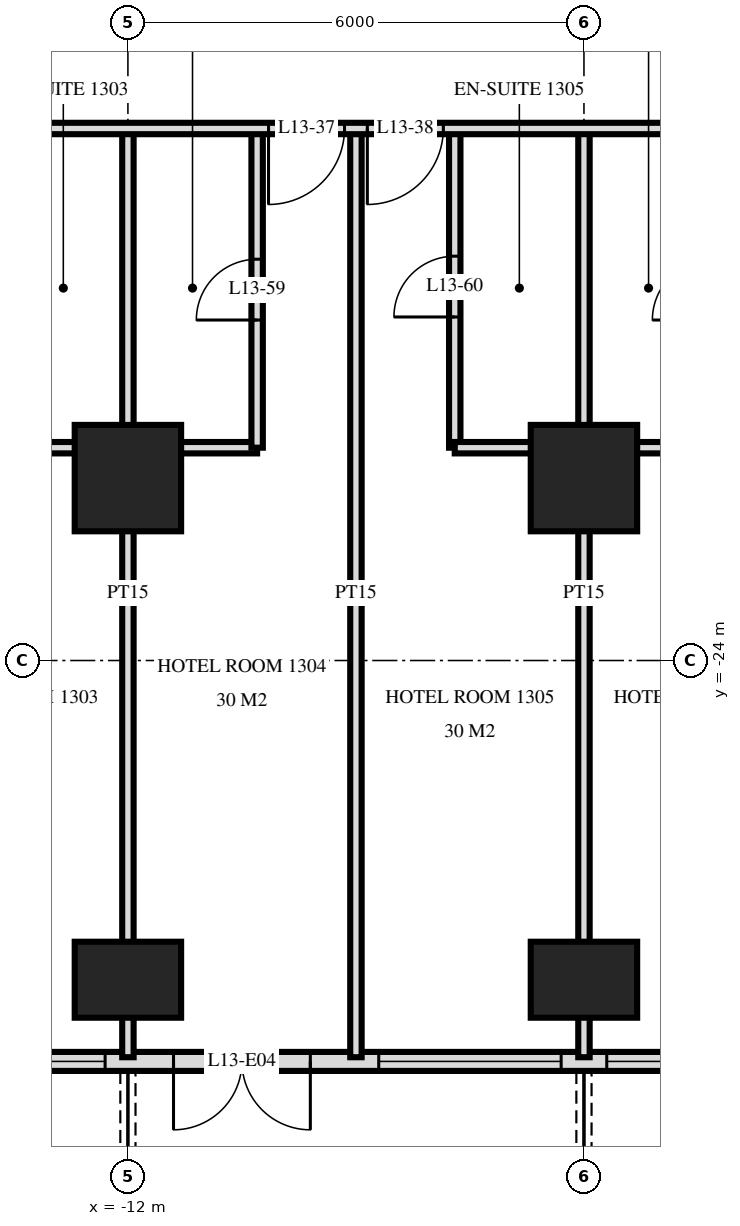
"""IFC4 building model, lengths in metres.
Left out: names, types, materials, properties, quantities, classifications, styles, units other than length and angle.
Written with IfcOpenShell. Run it as: python <this file> out.ifc"""

import sys

from ifc_helpers import new_model, si_unit, direction, frame, frame_2d, origin, origin_2d, place, context, subcontext, project, spatial, rectangle, extrude, element, fill, save


model = new_model("IFC4")
c1 = context("Model", 3, precision=1e-05, world=origin(), true_north=direction((0.0, 1.0)))
c2 = subcontext(c1, "Body", "Model", "MODEL_VIEW")
j1 = project(units=[si_unit("LENGTHUNIT", "METRE"), si_unit("PLANEANGLEUNIT", "RADIAN")], contexts=[c1])
p1 = place(None, origin())
s1 = spatial("IfcSite", under=j1, at=p1, CompositionType="ELEMENT")
p2 = place(p1, origin())
s2 = spatial("IfcBuilding", under=s1, at=p2, CompositionType="ELEMENT")
p3 = place(p2, frame((0.0, 0.0, 56.4)))
s3 = spatial("IfcBuildingStorey", under=s2, at=p3, CompositionType="ELEMENT", Elevation=56.4)
p4 = place(p3, frame((-12.0, -28.2, 0.0), z_axis=(0.0, 0.0, 1.0), x_axis=(1.0, 0.0, 0.0)))
e1 = element("IfcColumn", 1, at=p4, inside=s3, PredefinedType="COLUMN", context=c2, shape_type="SweptSolid", body=[
    extrude(rectangle(XDim=1.4, YDim=1.0, at=origin_2d()), origin(), (0.0, 0.0, 1.0), 3.6),
])
p5 = place(p3, frame((-12.0, -21.6, 0.0), z_axis=(0.0, 0.0, 1.0), x_axis=(1.0, 0.0, 0.0)))
e2 = element("IfcColumn", 2, at=p5, inside=s3, PredefinedType="COLUMN", context=c2, shape_type="SweptSolid", body=[
    extrude(rectangle(XDim=1.4, YDim=1.4, at=origin_2d()), origin(), (0.0, 0.0, 1.0), 3.6),
])
p6 = place(p3, frame((-6.0, -28.2, 0.0), z_axis=(0.0, 0.0, 1.0), x_axis=(1.0, 0.0, 0.0)))
e3 = element("IfcColumn", 3, at=p6, inside=s3, PredefinedType="COLUMN", context=c2, shape_type="SweptSolid", body=[
    extrude(rectangle(XDim=1.4, YDim=1.0, at=origin_2d()), origin(), (0.0, 0.0, 1.0), 3.6),
])
p7 = place(p3, frame((-6.0, -21.6, 0.0), z_axis=(0.0, 0.0, 1.0), x_axis=(1.0, 0.0, 0.0)))
e4 = element("IfcColumn", 4, at=p7, inside=s3, PredefinedType="COLUMN", context=c2, shape_type="SweptSolid", body=[
    extrude(rectangle(XDim=1.4, YDim=1.4, at=origin_2d()), origin(), (0.0, 0.0, 1.0), 3.6),
])
p8 = place(p3, frame((-28.775, -29.275, 0.0), z_axis=(0.0, 0.0, 1.0), x_axis=(1.0, 0.0, 0.0)))
e5 = element("IfcWall", 5, at=p8, inside=s3, PredefinedType="SOLIDWALL", context=c2, shape_type="SweptSolid", body=[
    extrude(rectangle(XDim=57.551, YDim=0.25, at=frame_2d((28.775, 0.0))), origin(), (0.0, 0.0, 1.0), 3.32),
])
p9 = place(p8, frame((0.575, 0.0, 0.0)))
e6 = element("IfcOpeningElement", 6, at=p9, cuts=e5, PredefinedType="OPENING", context=c2, shape_type="SweptSolid", body=[
    extrude(rectangle(XDim=1.8, YDim=2.4, at=frame_2d((0.9, 1.2))), frame((0.0, 0.135, 0.0), z_axis=(0.0, -1.0, 0.0), x_axis=(1.0, 0.0, 0.0)), (0.0, 0.0, 1.0), 0.27),
])
p10 = place(p8, frame((5.375, 0.0, 0.0)))
e7 = element("IfcOpeningElement", 7, at=p10, cuts=e5, PredefinedType="OPENING", context=c2, shape_type="SweptSolid", body=[
    extrude(rectangle(XDim=1.8, YDim=2.4, at=frame_2d((0.9, 1.2))), frame((0.0, 0.135, 0.0), z_axis=(0.0, -1.0, 0.0), x_axis=(1.0, 0.0, 0.0)), (0.0, 0.0, 1.0), 0.27),
])
p11 = place(p8, frame((8.075, 0.0, 0.3)))
e8 = element("IfcOpeningElement", 8, at=p11, cuts=e5, PredefinedType="OPENING", context=c2, shape_type="SweptSolid", body=[
    extrude(rectangle(XDim=2.4, YDim=2.1, at=frame_2d((1.2, 1.05))), frame((0.0, 0.135, 0.0), z_axis=(0.0, -1.0, 0.0), x_axis=(1.0, 0.0, 0.0)), (0.0, 0.0, 1.0), 0.27),
])
p12 = place(p8, frame((11.375, 0.0, 0.0)))
e9 = element("IfcOpeningElement", 9, at=p12, cuts=e5, PredefinedType="OPENING", context=c2, shape_type="SweptSolid", body=[
    extrude(rectangle(XDim=1.8, YDim=2.4, at=frame_2d((0.9, 1.2))), frame((0.0, 0.135, 0.0), z_axis=(0.0, -1.0, 0.0), x_axis=(1.0, 0.0, 0.0)), (0.0, 0.0, 1.0), 0.27),
])
p13 = place(p8, frame((14.075, 0.0, 0.3)))
e10 = element("IfcOpeningElement", 10, at=p13, cuts=e5, PredefinedType="OPENING", context=c2, shape_type="SweptSolid", body=[
    extrude(rectangle(XDim=2.4, YDim=2.1, at=frame_2d((1.2, 1.05))), frame((0.0, 0.135, 0.0), z_axis=(0.0, -1.0, 0.0), x_axis=(1.0, 0.0, 0.0)), (0.0, 0.0, 1.0), 0.27),
])
p14 = place(p8, frame((17.375, 0.0, 0.0)))
e11 = element("IfcOpeningElement", 11, at=p14, cuts=e5, PredefinedType="OPENING", context=c2, shape_type="SweptSolid", body=[
    extrude(rectangle(XDim=1.8, YDim=2.4, at=frame_2d((0.9, 1.2))), frame((0.0, 0.135, 0.0), z_axis=(0.0, -1.0, 0.0), x_axis=(1.0, 0.0, 0.0)), (0.0, 0.0, 1.0), 0.27),
])
p15 = place(p8, frame((20.075, 0.0, 0.3)))
e12 = element("IfcOpeningElement", 12, at=p15, cuts=e5, PredefinedType="OPENING", context=c2, shape_type="SweptSolid", body=[
    extrude(rectangle(XDim=2.4, YDim=2.1, at=frame_2d((1.2, 1.05))), frame((0.0, 0.135, 0.0), z_axis=(0.0, -1.0, 0.0), x_axis=(1.0, 0.0, 0.0)), (0.0, 0.0, 1.0), 0.27),
])
p16 = place(p8, frame((23.075, 0.0, 0.3)))
e13 = element("IfcOpeningElement", 13, at=p16, cuts=e5, PredefinedType="OPENING", context=c2, shape_type="SweptSolid", body=[
    extrude(rectangle(XDim=2.4, YDim=2.1, at=frame_2d((1.2, 1.05))), frame((0.0, 0.135, 0.0), z_axis=(0.0, -1.0, 0.0), x_axis=(1.0, 0.0, 0.0)), (0.0, 0.0, 1.0), 0.27),
])
p17 = place(p8, frame((26.375, 0.0, 0.0)))
e14 = element("IfcOpeningElement", 14, at=p17, cuts=e5, PredefinedType="OPENING", context=c2, shape_type="SweptSolid", body=[
    extrude(rectangle(XDim=1.8, YDim=2.4, at=frame_2d((0.9, 1.2))), frame((0.0, 0.135, 0.0), z_axis=(0.0, -1.0, 0.0), x_axis=(1.0, 0.0, 0.0)), (0.0, 0.0, 1.0), 0.27),
])
p18 = place(p8, frame((29.075, 0.0, 0.3)))
e15 = element("IfcOpeningElement", 15, at=p18, cuts=e5, PredefinedType="OPENING", context=c2, shape_type="SweptSolid", body=[
    extrude(rectangle(XDim=2.4, YDim=2.1, at=frame_2d((1.2, 1.05))), frame((0.0, 0.135, 0.0), z_axis=(0.0, -1.0, 0.0), x_axis=(1.0, 0.0, 0.0)), (0.0, 0.0, 1.0), 0.27),
])
p19 = place(p8, frame((32.375, 0.0, 0.0)))
e16 = element("IfcOpeningElement", 16, at=p19, cuts=e5, PredefinedType="OPENING", context=c2, shape_type="SweptSolid", body=[
    extrude(rectangle(XDim=1.8, YDim=2.4, at=frame_2d((0.9, 1.2))), frame((0.0, 0.135, 0.0), z_axis=(0.0, -1.0, 0.0), x_axis=(1.0, 0.0, 0.0)), (0.0, 0.0, 1.0), 0.27),
])
p20 = place(p8, frame((35.375, 0.0, 0.0)))
e17 = element("IfcOpeningElement", 17, at=p20, cuts=e5, PredefinedType="OPENING", context=c2, shape_type="SweptSolid", body=[
    extrude(rectangle(XDim=1.8, YDim=2.4, at=frame_2d((0.9, 1.2))), frame((0.0, 0.135, 0.0), z_axis=(0.0, -1.0, 0.0), x_axis=(1.0, 0.0, 0.0)), (0.0, 0.0, 1.0), 0.27),
])
p21 = place(p8, frame((38.075, 0.0, 0.3)))
e18 = element("IfcOpeningElement", 18, at=p21, cuts=e5, PredefinedType="OPENING", context=c2, shape_type="SweptSolid", body=[
    extrude(rectangle(XDim=2.4, YDim=2.1, at=frame_2d((1.2, 1.05))), frame((0.0, 0.135, 0.0), z_axis=(0.0, -1.0, 0.0), x_axis=(1.0, 0.0, 0.0)), (0.0, 0.0, 1.0), 0.27),
])
p22 = place(p8, frame((41.375, 0.0, 0.0)))
e19 = element("IfcOpeningElement", 19, at=p22, cuts=e5, PredefinedType="OPENING", context=c2, shape_type="SweptSolid", body=[
    extrude(rectangle(XDim=1.8, YDim=2.4, at=frame_2d((0.9, 1.2))), frame((0.0, 0.135, 0.0), z_axis=(0.0, -1.0, 0.0), x_axis=(1.0, 0.0, 0.0)), (0.0, 0.0, 1.0), 0.27),
])
p23 = place(p8, frame((44.075, 0.0, 0.3)))
e20 = element("IfcOpeningElement", 20, at=p23, cuts=e5, PredefinedType="OPENING", context=c2, shape_type="SweptSolid", body=[
    extrude(rectangle(XDim=2.4, YDim=2.1, at=frame_2d((1.2, 1.05))), frame((0.0, 0.135, 0.0), z_axis=(0.0, -1.0, 0.0), x_axis=(1.0, 0.0, 0.0)), (0.0, 0.0, 1.0), 0.27),
])
p24 = place(p8, frame((47.075, 0.0, 0.3)))
e21 = element("IfcOpeningElement", 21, at=p24, cuts=e5, PredefinedType="OPENING", context=c2, shape_type="SweptSolid", body=[
    extrude(rectangle(XDim=2.4, YDim=2.1, at=frame_2d((1.2, 1.05))), frame((0.0, 0.135, 0.0), z_axis=(0.0, -1.0, 0.0), x_axis=(1.0, 0.0, 0.0)), (0.0, 0.0, 1.0), 0.27),
])
p25 = place(p8, frame((50.375, 0.0, 0.0)))
e22 = element("IfcOpeningElement", 22, at=p25, cuts=e5, PredefinedType="OPENING", context=c2, shape_type="SweptSolid", body=[
    extrude(rectangle(XDim=1.8, YDim=2.4, at=frame_2d((0.9, 1.2))), frame((0.0, 0.135, 0.0), z_axis=(0.0, -1.0, 0.0), x_axis=(1.0, 0.0, 0.0)), (0.0, 0.0, 1.0), 0.27),
])
p26 = place(p8, frame((53.375, 0.0, 0.0)))
e23 = element("IfcOpeningElement", 23, at=p26, cuts=e5, PredefinedType="OPENING", context=c2, shape_type="SweptSolid", body=[
    extrude(rectangle(XDim=1.8, YDim=2.4, at=frame_2d((0.9, 1.2))), frame((0.0, 0.135, 0.0), z_axis=(0.0, -1.0, 0.0), x_axis=(1.0, 0.0, 0.0)), (0.0, 0.0, 1.0), 0.27),
])
p27 = place(p3, frame((-6.0, -29.22, 0.0), z_axis=(0.0, 0.0, 1.0), x_axis=(0.0, 1.0, 0.0)))
e24 = element("IfcWall", 24, at=p27, inside=s3, PredefinedType="PARTITIONING", context=c2, shape_type="SweptSolid", body=[
    extrude(rectangle(XDim=12.22, YDim=0.15, at=frame_2d((6.11, 0.0))), origin(), (0.0, 0.0, 1.0), 3.32),
])
p28 = place(p3, frame((-7.7, -21.2, 0.0), z_axis=(0.0, 0.0, 1.0), x_axis=(0.0, 1.0, 0.0)))
e25 = element("IfcWall", 25, at=p28, inside=s3, PredefinedType="PARTITIONING", context=c2, shape_type="SweptSolid", body=[
    extrude(rectangle(XDim=4.2, YDim=0.15, at=frame_2d((2.1, 0.0))), origin(), (0.0, 0.0, 1.0), 3.32),
])
p29 = place(p28, frame((1.72, 0.0, 0.0)))
e26 = element("IfcOpeningElement", 26, at=p29, cuts=e25, PredefinedType="OPENING", context=c2, shape_type="SweptSolid", body=[
    extrude(rectangle(XDim=0.8, YDim=2.1, at=frame_2d((0.4, 1.05))), frame((0.0, 0.085, 0.0), z_axis=(0.0, -1.0, 0.0), x_axis=(1.0, 0.0, 0.0)), (0.0, 0.0, 1.0), 0.17),
])
p30 = place(p3, frame((-9.0, -29.22, 0.0), z_axis=(0.0, 0.0, 1.0), x_axis=(0.0, 1.0, 0.0)))
e27 = element("IfcWall", 27, at=p30, inside=s3, PredefinedType="PARTITIONING", context=c2, shape_type="SweptSolid", body=[
    extrude(rectangle(XDim=12.22, YDim=0.15, at=frame_2d((6.11, 0.0))), origin(), (0.0, 0.0, 1.0), 3.32),
])
p31 = place(p3, frame((-10.3, -21.2, 0.0), z_axis=(0.0, 0.0, 1.0), x_axis=(0.0, 1.0, 0.0)))
e28 = element("IfcWall", 28, at=p31, inside=s3, PredefinedType="PARTITIONING", context=c2, shape_type="SweptSolid", body=[
    extrude(rectangle(XDim=4.2, YDim=0.15, at=frame_2d((2.1, 0.0))), origin(), (0.0, 0.0, 1.0), 3.32),
])
p32 = place(p31, frame((1.68, 0.0, 0.0)))
e29 = element("IfcOpeningElement", 29, at=p32, cuts=e28, PredefinedType="OPENING", context=c2, shape_type="SweptSolid", body=[
    extrude(rectangle(XDim=0.8, YDim=2.1, at=frame_2d((0.4, 1.05))), frame((0.0, 0.085, 0.0), z_axis=(0.0, -1.0, 0.0), x_axis=(1.0, 0.0, 0.0)), (0.0, 0.0, 1.0), 0.17),
])
p33 = place(p3, frame((-12.0, -29.22, 0.0), z_axis=(0.0, 0.0, 1.0), x_axis=(0.0, 1.0, 0.0)))
e30 = element("IfcWall", 30, at=p33, inside=s3, PredefinedType="PARTITIONING", context=c2, shape_type="SweptSolid", body=[
    extrude(rectangle(XDim=12.22, YDim=0.15, at=frame_2d((6.11, 0.0))), origin(), (0.0, 0.0, 1.0), 3.32),
])
for number, where, z_axis, x_axis in (
    (31, (-13.7, -21.2, 0.0), (0.0, 0.0, 1.0), (1.0, 0.0, 0.0)),
    (32, (-7.7, -21.2, 0.0), (0.0, 0.0, 1.0), (1.0, 0.0, 0.0)),
):
    element("IfcWall", number, at=place(p3, frame(where, z_axis=z_axis, x_axis=x_axis)), inside=s3, PredefinedType="PARTITIONING", context=c2, shape_type="SweptSolid", body=[
        extrude(rectangle(XDim=3.4, YDim=0.15, at=frame_2d((1.7, 0.0))), origin(), (0.0, 0.0, 1.0), 3.32),
    ])
p34 = place(p3, frame((-33.12, -17.0, 0.0), z_axis=(0.0, 0.0, 1.0), x_axis=(1.0, 0.0, 0.0)))
e33 = element("IfcWall", 33, at=p34, inside=s3, PredefinedType="PARTITIONING", context=c2, shape_type="SweptSolid", body=[
    extrude(rectangle(XDim=66.24, YDim=0.15, at=frame_2d((33.12, 0.0))), origin(), (0.0, 0.0, 1.0), 3.32),
])
p35 = place(p34, frame((12.27, 0.0, 0.0)))
e34 = element("IfcOpeningElement", 34, at=p35, cuts=e33, PredefinedType="OPENING", context=c2, shape_type="SweptSolid", body=[
    extrude(rectangle(XDim=1.0, YDim=2.1, at=frame_2d((0.5, 1.05))), frame((0.0, 0.085, 0.0), z_axis=(0.0, -1.0, 0.0), x_axis=(1.0, 0.0, 0.0)), (0.0, 0.0, 1.0), 0.17),
])
p36 = place(p34, frame((16.97, 0.0, 0.0)))
e35 = element("IfcOpeningElement", 35, at=p36, cuts=e33, PredefinedType="OPENING", context=c2, shape_type="SweptSolid", body=[
    extrude(rectangle(XDim=1.0, YDim=2.1, at=frame_2d((0.5, 1.05))), frame((0.0, 0.085, 0.0), z_axis=(0.0, -1.0, 0.0), x_axis=(1.0, 0.0, 0.0)), (0.0, 0.0, 1.0), 0.17),
])
p37 = place(p34, frame((18.27, 0.0, 0.0)))
e36 = element("IfcOpeningElement", 36, at=p37, cuts=e33, PredefinedType="OPENING", context=c2, shape_type="SweptSolid", body=[
    extrude(rectangle(XDim=1.0, YDim=2.1, at=frame_2d((0.5, 1.05))), frame((0.0, 0.085, 0.0), z_axis=(0.0, -1.0, 0.0), x_axis=(1.0, 0.0, 0.0)), (0.0, 0.0, 1.0), 0.17),
])
p38 = place(p34, frame((22.97, 0.0, 0.0)))
e37 = element("IfcOpeningElement", 37, at=p38, cuts=e33, PredefinedType="OPENING", context=c2, shape_type="SweptSolid", body=[
    extrude(rectangle(XDim=1.0, YDim=2.1, at=frame_2d((0.5, 1.05))), frame((0.0, 0.085, 0.0), z_axis=(0.0, -1.0, 0.0), x_axis=(1.0, 0.0, 0.0)), (0.0, 0.0, 1.0), 0.17),
])
p39 = place(p34, frame((24.27, 0.0, 0.0)))
e38 = element("IfcOpeningElement", 38, at=p39, cuts=e33, PredefinedType="OPENING", context=c2, shape_type="SweptSolid", body=[
    extrude(rectangle(XDim=1.0, YDim=2.1, at=frame_2d((0.5, 1.05))), frame((0.0, 0.085, 0.0), z_axis=(0.0, -1.0, 0.0), x_axis=(1.0, 0.0, 0.0)), (0.0, 0.0, 1.0), 0.17),
])
p40 = place(p34, frame((28.97, 0.0, 0.0)))
e39 = element("IfcOpeningElement", 39, at=p40, cuts=e33, PredefinedType="OPENING", context=c2, shape_type="SweptSolid", body=[
    extrude(rectangle(XDim=1.0, YDim=2.1, at=frame_2d((0.5, 1.05))), frame((0.0, 0.085, 0.0), z_axis=(0.0, -1.0, 0.0), x_axis=(1.0, 0.0, 0.0)), (0.0, 0.0, 1.0), 0.17),
])
p41 = place(p34, frame((30.27, 0.0, 0.0)))
e40 = element("IfcOpeningElement", 40, at=p41, cuts=e33, PredefinedType="OPENING", context=c2, shape_type="SweptSolid", body=[
    extrude(rectangle(XDim=1.0, YDim=2.1, at=frame_2d((0.5, 1.05))), frame((0.0, 0.085, 0.0), z_axis=(0.0, -1.0, 0.0), x_axis=(1.0, 0.0, 0.0)), (0.0, 0.0, 1.0), 0.17),
])
p42 = place(p34, frame((33.82, 0.0, 0.0)))
e41 = element("IfcOpeningElement", 41, at=p42, cuts=e33, PredefinedType="OPENING", context=c2, shape_type="SweptSolid", body=[
    extrude(rectangle(XDim=1.0, YDim=2.1, at=frame_2d((0.5, 1.05))), frame((0.0, 0.085, 0.0), z_axis=(0.0, -1.0, 0.0), x_axis=(1.0, 0.0, 0.0)), (0.0, 0.0, 1.0), 0.17),
])
p43 = place(p34, frame((46.27, 0.0, 0.0)))
e42 = element("IfcOpeningElement", 42, at=p43, cuts=e33, PredefinedType="OPENING", context=c2, shape_type="SweptSolid", body=[
    extrude(rectangle(XDim=1.0, YDim=2.1, at=frame_2d((0.5, 1.05))), frame((0.0, 0.085, 0.0), z_axis=(0.0, -1.0, 0.0), x_axis=(1.0, 0.0, 0.0)), (0.0, 0.0, 1.0), 0.17),
])
p44 = place(p34, frame((52.97, 0.0, 0.0)))
e43 = element("IfcOpeningElement", 43, at=p44, cuts=e33, PredefinedType="OPENING", context=c2, shape_type="SweptSolid", body=[
    extrude(rectangle(XDim=1.0, YDim=2.1, at=frame_2d((0.5, 1.05))), frame((0.0, 0.085, 0.0), z_axis=(0.0, -1.0, 0.0), x_axis=(1.0, 0.0, 0.0)), (0.0, 0.0, 1.0), 0.17),
])
p45 = place(p34, frame((6.05, 0.0, 0.0)))
e44 = element("IfcOpeningElement", 44, at=p45, cuts=e33, PredefinedType="OPENING", context=c2, shape_type="SweptSolid", body=[
    extrude(rectangle(XDim=1.0, YDim=2.1, at=frame_2d((0.5, 1.05))), frame((0.0, 0.085, 0.0), z_axis=(0.0, -1.0, 0.0), x_axis=(1.0, 0.0, 0.0)), (0.0, 0.0, 1.0), 0.17),
])
p46 = place(p34, frame((59.15, 0.0, 0.0)))
e45 = element("IfcOpeningElement", 45, at=p46, cuts=e33, PredefinedType="OPENING", context=c2, shape_type="SweptSolid", body=[
    extrude(rectangle(XDim=1.0, YDim=2.1, at=frame_2d((0.5, 1.05))), frame((0.0, 0.085, 0.0), z_axis=(0.0, -1.0, 0.0), x_axis=(1.0, 0.0, 0.0)), (0.0, 0.0, 1.0), 0.17),
])
p47 = place(p13, origin())
e46 = element("IfcWindow", 46, at=p47, inside=s3, PartitioningType="SINGLE_PANEL", PredefinedType="WINDOW", context=c2, shape_type="SweptSolid", body=[
    extrude(rectangle(XDim=2.4, YDim=2.1, at=frame_2d((1.2, 1.05))), frame((0.0, 0.03, 0.0), z_axis=(0.0, -1.0, 0.0), x_axis=(1.0, 0.0, 0.0)), (0.0, 0.0, 1.0), 0.06),
])
fill(e10, e46)
p48 = place(p14, frame((0.9, 0.0, 0.0), z_axis=(0.0, 0.0, 1.0), x_axis=(-1.0, 0.0, 0.0)))
e47 = element("IfcDoor", 47, at=p48, inside=s3, OperationType="DOUBLE_DOOR_SINGLE_SWING", PredefinedType="DOOR", context=c2, shape_type="SweptSolid", body=[
    extrude(rectangle(XDim=1.8, YDim=2.4, at=frame_2d((0.0, 1.2))), frame((0.0, -0.025, 0.0), z_axis=(0.0, 1.0, 0.0), x_axis=(-1.0, 0.0, 0.0)), (0.0, 0.0, 1.0), 0.05),
])
fill(e11, e47)
p49 = place(p15, origin())
e48 = element("IfcWindow", 48, at=p49, inside=s3, PartitioningType="SINGLE_PANEL", PredefinedType="WINDOW", context=c2, shape_type="SweptSolid", body=[
    extrude(rectangle(XDim=2.4, YDim=2.1, at=frame_2d((1.2, 1.05))), frame((0.0, 0.03, 0.0), z_axis=(0.0, -1.0, 0.0), x_axis=(1.0, 0.0, 0.0)), (0.0, 0.0, 1.0), 0.06),
])
fill(e12, e48)
p50 = place(p16, origin())
e49 = element("IfcWindow", 49, at=p50, inside=s3, PartitioningType="SINGLE_PANEL", PredefinedType="WINDOW", context=c2, shape_type="SweptSolid", body=[
    extrude(rectangle(XDim=2.4, YDim=2.1, at=frame_2d((1.2, 1.05))), frame((0.0, 0.03, 0.0), z_axis=(0.0, -1.0, 0.0), x_axis=(1.0, 0.0, 0.0)), (0.0, 0.0, 1.0), 0.06),
])
fill(e13, e49)
p51 = place(p38, frame((0.5, 0.0, 0.0), z_axis=(0.0, 0.0, 1.0), x_axis=(-1.0, 0.0, 0.0)))
e50 = element("IfcDoor", 50, at=p51, inside=s3, OperationType="SINGLE_SWING_LEFT", PredefinedType="DOOR", context=c2, shape_type="SweptSolid", body=[
    extrude(rectangle(XDim=1.0, YDim=2.1, at=frame_2d((0.0, 1.05))), frame((0.0, -0.025, 0.0), z_axis=(0.0, 1.0, 0.0), x_axis=(-1.0, 0.0, 0.0)), (0.0, 0.0, 1.0), 0.05),
])
fill(e37, e50)
p52 = place(p39, frame((0.5, 0.0, 0.0), z_axis=(0.0, 0.0, 1.0), x_axis=(-1.0, 0.0, 0.0)))
e51 = element("IfcDoor", 51, at=p52, inside=s3, OperationType="SINGLE_SWING_LEFT", PredefinedType="DOOR", context=c2, shape_type="SweptSolid", body=[
    extrude(rectangle(XDim=1.0, YDim=2.1, at=frame_2d((0.0, 1.05))), frame((0.0, -0.025, 0.0), z_axis=(0.0, 1.0, 0.0), x_axis=(-1.0, 0.0, 0.0)), (0.0, 0.0, 1.0), 0.05),
])
fill(e38, e51)
p53 = place(p32, origin())
e52 = element("IfcDoor", 52, at=p53, inside=s3, OperationType="SINGLE_SWING_RIGHT", PredefinedType="DOOR", context=c2, shape_type="SweptSolid", body=[
    extrude(rectangle(XDim=0.8, YDim=2.1, at=frame_2d((0.4, 1.05))), frame((0.0, 0.025, 0.0), z_axis=(0.0, -1.0, 0.0), x_axis=(1.0, 0.0, 0.0)), (0.0, 0.0, 1.0), 0.05),
])
fill(e29, e52)
p54 = place(p29, origin())
e53 = element("IfcDoor", 53, at=p54, inside=s3, OperationType="SINGLE_SWING_RIGHT", PredefinedType="DOOR", context=c2, shape_type="SweptSolid", body=[
    extrude(rectangle(XDim=0.8, YDim=2.1, at=frame_2d((0.4, 1.05))), frame((0.0, 0.025, 0.0), z_axis=(0.0, -1.0, 0.0), x_axis=(1.0, 0.0, 0.0)), (0.0, 0.0, 1.0), 0.05),
])
fill(e26, e53)
save(model, sys.argv[1])
